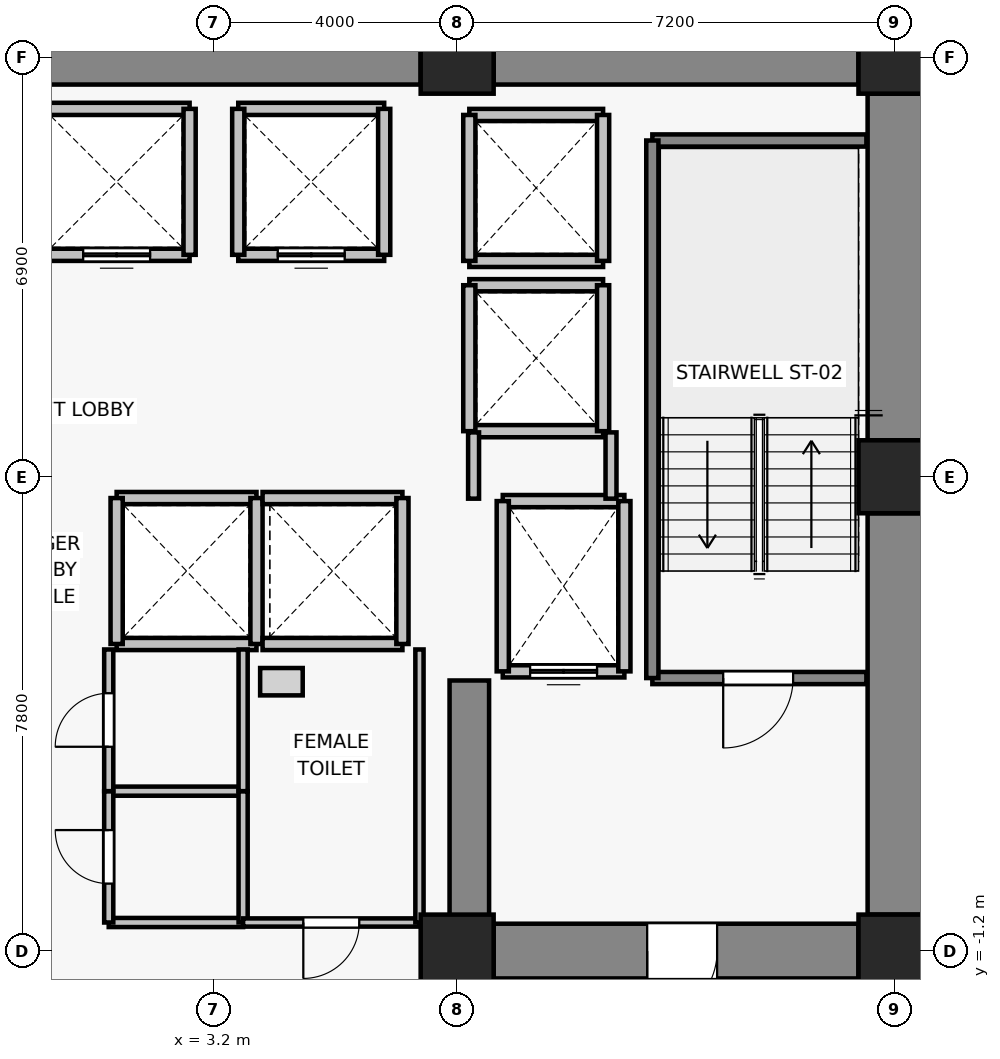
"""IFC4 building model, lengths in metres.
Left out: names, types, materials, properties, quantities, classifications, styles, units other than length and angle.
Written with IfcOpenShell. Run it as: python <this file> out.ifc"""

import sys

from ifc_helpers import new_model, si_unit, direction, frame, frame_2d, origin, origin_2d, place, context, subcontext, project, spatial, rectangle, extrude, source, transform, mapped, element, fill, save


model = new_model("IFC4")
c1 = context("Model", 3, precision=1e-05, world=origin(), true_north=direction((0.0, 1.0)))
c2 = subcontext(c1, "Body", "Model", "MODEL_VIEW")
j1 = project(units=[si_unit("LENGTHUNIT", "METRE"), si_unit("PLANEANGLEUNIT", "RADIAN")], contexts=[c1])
p1 = place(None, origin())
s1 = spatial("IfcSite", under=j1, at=p1, CompositionType="ELEMENT")
p2 = place(p1, origin())
s2 = spatial("IfcBuilding", under=s1, at=p2, CompositionType="ELEMENT")
p3 = place(p2, frame((0.0, 0.0, 67.0)))
s3 = spatial("IfcBuildingStorey", under=s2, at=p3, CompositionType="ELEMENT", Elevation=67.0)
for number, where, z_axis, x_axis in (
    (1, (7.2, -1.2, 0.0), (0.0, 0.0, 1.0), (1.0, 0.0, 0.0)),
    (2, (14.4, -1.2, 0.0), (0.0, 0.0, 1.0), (1.0, 0.0, 0.0)),
    (3, (14.4, 6.6, 0.0), (0.0, 0.0, 1.0), (1.0, 0.0, 0.0)),
    (4, (7.2, 13.5, 0.0), (0.0, 0.0, 1.0), (1.0, 0.0, 0.0)),
    (5, (14.4, 13.5, 0.0), (0.0, 0.0, 1.0), (1.0, 0.0, 0.0)),
):
    element("IfcColumn", number, at=place(p3, frame(where, z_axis=z_axis, x_axis=x_axis)), inside=s3, PredefinedType="COLUMN", context=c2, shape_type="SweptSolid", body=[
        extrude(rectangle(XDim=1.2, YDim=1.2, at=origin_2d()), origin(), (0.0, 0.0, 1.0), 3.3),
    ])
p4 = place(p3, frame((-6.6, 13.5, 0.0), z_axis=(0.0, 0.0, 1.0), x_axis=(1.0, 0.0, 0.0)))
e6 = element("IfcWall", 6, at=p4, inside=s3, PredefinedType="SHEAR", context=c2, shape_type="SweptSolid", body=[
    extrude(rectangle(XDim=13.2, YDim=0.9, at=frame_2d((6.6, 0.0))), origin(), (0.0, 0.0, 1.0), 3.075),
])
p5 = place(p3, frame((7.8, 13.5, 0.0), z_axis=(0.0, 0.0, 1.0), x_axis=(1.0, 0.0, 0.0)))
e7 = element("IfcWall", 7, at=p5, inside=s3, PredefinedType="SHEAR", context=c2, shape_type="SweptSolid", body=[
    extrude(rectangle(XDim=6.0, YDim=0.9, at=frame_2d((3.0, 0.0))), origin(), (0.0, 0.0, 1.0), 3.075),
])
p6 = place(p3, frame((14.4, -0.6, 0.0), z_axis=(0.0, 0.0, 1.0), x_axis=(0.0, 1.0, 0.0)))
e8 = element("IfcWall", 8, at=p6, inside=s3, PredefinedType="SHEAR", context=c2, shape_type="SweptSolid", body=[
    extrude(rectangle(XDim=6.6, YDim=0.9, at=frame_2d((3.3, 0.0))), origin(), (0.0, 0.0, 1.0), 3.075),
])
p7 = place(p3, frame((14.4, 7.2, 0.0), z_axis=(0.0, 0.0, 1.0), x_axis=(0.0, 1.0, 0.0)))
e9 = element("IfcWall", 9, at=p7, inside=s3, PredefinedType="SHEAR", context=c2, shape_type="SweptSolid", body=[
    extrude(rectangle(XDim=5.7, YDim=0.9, at=frame_2d((2.85, 0.0))), origin(), (0.0, 0.0, 1.0), 3.075),
])
p8 = place(p3, frame((13.8, -1.2, 0.0), z_axis=(0.0, 0.0, 1.0), x_axis=(-1.0, 0.0, 0.0)))
e10 = element("IfcWall", 10, at=p8, inside=s3, PredefinedType="SHEAR", context=c2, shape_type="SweptSolid", body=[
    extrude(rectangle(XDim=6.0, YDim=0.9, at=frame_2d((3.0, 0.0))), origin(), (0.0, 0.0, 1.0), 3.075),
])
p9 = place(p8, frame((2.325, 0.0, 0.0)))
e11 = element("IfcOpeningElement", 11, at=p9, cuts=e10, PredefinedType="OPENING", context=c2, shape_type="SweptSolid", body=[
    extrude(rectangle(XDim=1.15, YDim=2.15, at=frame_2d((0.575, 1.075))), frame((0.0, 0.46, 0.0), z_axis=(0.0, -1.0, 0.0), x_axis=(1.0, 0.0, 0.0)), (0.0, 0.0, 1.0), 0.92),
])
p10 = place(p3, frame((7.4, -0.75, 0.0), z_axis=(0.0, 0.0, 1.0), x_axis=(0.0, 1.0, 0.0)))
e12 = element("IfcWall", 12, at=p10, inside=s3, PredefinedType="SHEAR", context=c2, shape_type="SweptSolid", body=[
    extrude(rectangle(XDim=4.0, YDim=0.65, at=frame_2d((2.0, 0.0))), origin(), (0.0, 0.0, 1.0), 3.075),
])
p11 = place(p3, frame((9.95, 3.4, 0.0), z_axis=(0.0, 0.0, 1.0), x_axis=(-1.0, 0.0, 0.0)))
e13 = element("IfcWall", 13, at=p11, inside=s3, PredefinedType="SOLIDWALL", context=c2, shape_type="SweptSolid", body=[
    extrude(rectangle(XDim=2.0, YDim=0.2, at=frame_2d((1.0, 0.0))), origin(), (0.0, 0.0, 1.0), 3.075),
])
p12 = place(p11, frame((0.45, 0.0, 0.0)))
e14 = element("IfcOpeningElement", 14, at=p12, cuts=e13, PredefinedType="OPENING", context=c2, shape_type="SweptSolid", body=[
    extrude(rectangle(XDim=1.1, YDim=2.2, at=frame_2d((0.55, 1.1))), frame((0.0, 0.11, 0.0), z_axis=(0.0, -1.0, 0.0), x_axis=(1.0, 0.0, 0.0)), (0.0, 0.0, 1.0), 0.22),
])
p13 = place(p3, frame((7.95, 6.2, 0.0), z_axis=(0.0, 0.0, 1.0), x_axis=(1.0, 0.0, 0.0)))
e15 = element("IfcWall", 15, at=p13, inside=s3, PredefinedType="SOLIDWALL", context=c2, shape_type="SweptSolid", body=[
    extrude(rectangle(XDim=2.0, YDim=0.2, at=frame_2d((1.0, 0.0))), origin(), (0.0, 0.0, 1.0), 3.075),
])
for number, where, z_axis, x_axis in (
    (16, (7.95, 3.4, 0.0), (0.0, 0.0, 1.0), (0.0, 1.0, 0.0)),
    (17, (9.95, 6.2, 0.0), (0.0, 0.0, 1.0), (0.0, -1.0, 0.0)),
):
    element("IfcWall", number, at=place(p3, frame(where, z_axis=z_axis, x_axis=x_axis)), inside=s3, PredefinedType="SOLIDWALL", context=c2, shape_type="SweptSolid", body=[
        extrude(rectangle(XDim=2.8, YDim=0.2, at=frame_2d((1.4, 0.0))), origin(), (0.0, 0.0, 1.0), 3.075),
    ])
p14 = place(p3, frame((2.8, 10.25, 0.0), z_axis=(0.0, 0.0, 1.0), x_axis=(-1.0, 0.0, 0.0)))
e18 = element("IfcWall", 18, at=p14, inside=s3, PredefinedType="SOLIDWALL", context=c2, shape_type="SweptSolid", body=[
    extrude(rectangle(XDim=2.4, YDim=0.2, at=frame_2d((1.2, 0.0))), origin(), (0.0, 0.0, 1.0), 3.075),
])
p15 = place(p14, frame((0.65, 0.0, 0.0)))
e19 = element("IfcOpeningElement", 19, at=p15, cuts=e18, PredefinedType="OPENING", context=c2, shape_type="SweptSolid", body=[
    extrude(rectangle(XDim=1.1, YDim=2.2, at=frame_2d((0.55, 1.1))), frame((0.0, 0.11, 0.0), z_axis=(0.0, -1.0, 0.0), x_axis=(1.0, 0.0, 0.0)), (0.0, 0.0, 1.0), 0.22),
])
p16 = place(p3, frame((0.4, 12.65, 0.0), z_axis=(0.0, 0.0, 1.0), x_axis=(1.0, 0.0, 0.0)))
e20 = element("IfcWall", 20, at=p16, inside=s3, PredefinedType="SOLIDWALL", context=c2, shape_type="SweptSolid", body=[
    extrude(rectangle(XDim=2.4, YDim=0.2, at=frame_2d((1.2, 0.0))), origin(), (0.0, 0.0, 1.0), 3.075),
])
p17 = place(p3, frame((2.8, 12.65, 0.0), z_axis=(0.0, 0.0, 1.0), x_axis=(0.0, -1.0, 0.0)))
e21 = element("IfcWall", 21, at=p17, inside=s3, PredefinedType="SOLIDWALL", context=c2, shape_type="SweptSolid", body=[
    extrude(rectangle(XDim=2.4, YDim=0.2, at=frame_2d((1.2, 0.0))), origin(), (0.0, 0.0, 1.0), 3.075),
])
p18 = place(p3, frame((6.0, 10.25, 0.0), z_axis=(0.0, 0.0, 1.0), x_axis=(-1.0, 0.0, 0.0)))
e22 = element("IfcWall", 22, at=p18, inside=s3, PredefinedType="SOLIDWALL", context=c2, shape_type="SweptSolid", body=[
    extrude(rectangle(XDim=2.4, YDim=0.2, at=frame_2d((1.2, 0.0))), origin(), (0.0, 0.0, 1.0), 3.075),
])
p19 = place(p18, frame((0.65, 0.0, 0.0)))
e23 = element("IfcOpeningElement", 23, at=p19, cuts=e22, PredefinedType="OPENING", context=c2, shape_type="SweptSolid", body=[
    extrude(rectangle(XDim=1.1, YDim=2.2, at=frame_2d((0.55, 1.1))), frame((0.0, 0.11, 0.0), z_axis=(0.0, -1.0, 0.0), x_axis=(1.0, 0.0, 0.0)), (0.0, 0.0, 1.0), 0.22),
])
for number, where, z_axis, x_axis in (
    (24, (3.6, 12.65, 0.0), (0.0, 0.0, 1.0), (1.0, 0.0, 0.0)),
    (25, (3.6, 10.25, 0.0), (0.0, 0.0, 1.0), (0.0, 1.0, 0.0)),
    (26, (6.0, 12.65, 0.0), (0.0, 0.0, 1.0), (0.0, -1.0, 0.0)),
):
    element("IfcWall", number, at=place(p3, frame(where, z_axis=z_axis, x_axis=x_axis)), inside=s3, PredefinedType="SOLIDWALL", context=c2, shape_type="SweptSolid", body=[
        extrude(rectangle(XDim=2.4, YDim=0.2, at=frame_2d((1.2, 0.0))), origin(), (0.0, 0.0, 1.0), 3.075),
    ])
for number, where, z_axis, x_axis in (
    (27, (3.9, 3.85, 0.0), (0.0, 0.0, 1.0), (-1.0, 0.0, 0.0)),
    (28, (1.6, 6.25, 0.0), (0.0, 0.0, 1.0), (1.0, 0.0, 0.0)),
):
    element("IfcWall", number, at=place(p3, frame(where, z_axis=z_axis, x_axis=x_axis)), inside=s3, PredefinedType="SOLIDWALL", context=c2, shape_type="SweptSolid", body=[
        extrude(rectangle(XDim=2.3, YDim=0.2, at=frame_2d((1.15, 0.0))), origin(), (0.0, 0.0, 1.0), 3.075),
    ])
for number, where, z_axis, x_axis in (
    (29, (1.6, 3.85, 0.0), (0.0, 0.0, 1.0), (0.0, 1.0, 0.0)),
    (30, (3.9, 6.25, 0.0), (0.0, 0.0, 1.0), (0.0, -1.0, 0.0)),
):
    element("IfcWall", number, at=place(p3, frame(where, z_axis=z_axis, x_axis=x_axis)), inside=s3, PredefinedType="SOLIDWALL", context=c2, shape_type="SweptSolid", body=[
        extrude(rectangle(XDim=2.4, YDim=0.2, at=frame_2d((1.2, 0.0))), origin(), (0.0, 0.0, 1.0), 3.075),
    ])
for number, where, z_axis, x_axis in (
    (31, (6.3, 3.85, 0.0), (0.0, 0.0, 1.0), (-1.0, 0.0, 0.0)),
    (32, (4.0, 6.25, 0.0), (0.0, 0.0, 1.0), (1.0, 0.0, 0.0)),
):
    element("IfcWall", number, at=place(p3, frame(where, z_axis=z_axis, x_axis=x_axis)), inside=s3, PredefinedType="SOLIDWALL", context=c2, shape_type="SweptSolid", body=[
        extrude(rectangle(XDim=2.3, YDim=0.2, at=frame_2d((1.15, 0.0))), origin(), (0.0, 0.0, 1.0), 3.075),
    ])
p20 = place(p3, frame((6.3, 6.25, 0.0), z_axis=(0.0, 0.0, 1.0), x_axis=(0.0, -1.0, 0.0)))
e33 = element("IfcWall", 33, at=p20, inside=s3, PredefinedType="SOLIDWALL", context=c2, shape_type="SweptSolid", body=[
    extrude(rectangle(XDim=2.4, YDim=0.2, at=frame_2d((1.2, 0.0))), origin(), (0.0, 0.0, 1.0), 3.075),
])
for number, where, z_axis, x_axis in (
    (34, (9.6, 7.35, 0.0), (0.0, 0.0, 1.0), (-1.0, 0.0, 0.0)),
    (35, (7.4, 9.75, 0.0), (0.0, 0.0, 1.0), (1.0, 0.0, 0.0)),
):
    element("IfcWall", number, at=place(p3, frame(where, z_axis=z_axis, x_axis=x_axis)), inside=s3, PredefinedType="SOLIDWALL", context=c2, shape_type="SweptSolid", body=[
        extrude(rectangle(XDim=2.2, YDim=0.2, at=frame_2d((1.1, 0.0))), origin(), (0.0, 0.0, 1.0), 2.465),
    ])
p21 = place(p3, frame((7.4, 7.35, 0.0), z_axis=(0.0, 0.0, 1.0), x_axis=(0.0, 1.0, 0.0)))
e36 = element("IfcWall", 36, at=p21, inside=s3, PredefinedType="SOLIDWALL", context=c2, shape_type="SweptSolid", body=[
    extrude(rectangle(XDim=2.4, YDim=0.2, at=frame_2d((1.2, 0.0))), origin(), (0.0, 0.0, 1.0), 2.465),
])
p22 = place(p3, frame((9.6, 9.75, 0.0), z_axis=(0.0, 0.0, 1.0), x_axis=(0.0, -1.0, 0.0)))
e37 = element("IfcWall", 37, at=p22, inside=s3, PredefinedType="SOLIDWALL", context=c2, shape_type="SweptSolid", body=[
    extrude(rectangle(XDim=2.4, YDim=0.2, at=frame_2d((1.2, 0.0))), origin(), (0.0, 0.0, 1.0), 3.075),
])
for number, where, z_axis, x_axis in (
    (38, (9.6, 10.15, 0.0), (0.0, 0.0, 1.0), (-1.0, 0.0, 0.0)),
    (39, (7.4, 12.55, 0.0), (0.0, 0.0, 1.0), (1.0, 0.0, 0.0)),
):
    element("IfcWall", number, at=place(p3, frame(where, z_axis=z_axis, x_axis=x_axis)), inside=s3, PredefinedType="SOLIDWALL", context=c2, shape_type="SweptSolid", body=[
        extrude(rectangle(XDim=2.2, YDim=0.2, at=frame_2d((1.1, 0.0))), origin(), (0.0, 0.0, 1.0), 2.465),
    ])
p23 = place(p3, frame((7.4, 10.15, 0.0), z_axis=(0.0, 0.0, 1.0), x_axis=(0.0, 1.0, 0.0)))
e40 = element("IfcWall", 40, at=p23, inside=s3, PredefinedType="SOLIDWALL", context=c2, shape_type="SweptSolid", body=[
    extrude(rectangle(XDim=2.4, YDim=0.2, at=frame_2d((1.2, 0.0))), origin(), (0.0, 0.0, 1.0), 2.465),
])
p24 = place(p3, frame((9.6, 12.55, 0.0), z_axis=(0.0, 0.0, 1.0), x_axis=(0.0, -1.0, 0.0)))
e41 = element("IfcWall", 41, at=p24, inside=s3, PredefinedType="SOLIDWALL", context=c2, shape_type="SweptSolid", body=[
    extrude(rectangle(XDim=2.4, YDim=0.2, at=frame_2d((1.2, 0.0))), origin(), (0.0, 0.0, 1.0), 3.075),
])
p25 = place(p3, frame((13.93, 3.29, 0.0), z_axis=(0.0, 0.0, 1.0), x_axis=(-1.0, 0.0, 0.0)))
e42 = element("IfcWall", 42, at=p25, inside=s3, PredefinedType="SOLIDWALL", context=c2, shape_type="SweptSolid", body=[
    extrude(rectangle(XDim=3.52, YDim=0.2, at=frame_2d((1.76, 0.0))), origin(), (0.0, 0.0, 1.0), 3.075),
])
p26 = place(p25, frame((1.205, 0.0, 0.0)))
e43 = element("IfcOpeningElement", 43, at=p26, cuts=e42, PredefinedType="OPENING", context=c2, shape_type="SweptSolid", body=[
    extrude(rectangle(XDim=1.15, YDim=2.15, at=frame_2d((0.575, 1.075))), frame((0.0, 0.11, 0.0), z_axis=(0.0, -1.0, 0.0), x_axis=(1.0, 0.0, 0.0)), (0.0, 0.0, 1.0), 0.22),
])
p27 = place(p3, frame((10.41, 12.13, 0.0), z_axis=(0.0, 0.0, 1.0), x_axis=(1.0, 0.0, 0.0)))
e44 = element("IfcWall", 44, at=p27, inside=s3, PredefinedType="SOLIDWALL", context=c2, shape_type="SweptSolid", body=[
    extrude(rectangle(XDim=3.52, YDim=0.2, at=frame_2d((1.76, 0.0))), origin(), (0.0, 0.0, 1.0), 3.075),
])
p28 = place(p3, frame((10.41, 3.29, 0.0), z_axis=(0.0, 0.0, 1.0), x_axis=(0.0, 1.0, 0.0)))
e45 = element("IfcWall", 45, at=p28, inside=s3, PredefinedType="SOLIDWALL", context=c2, shape_type="SweptSolid", body=[
    extrude(rectangle(XDim=8.84, YDim=0.2, at=frame_2d((4.42, 0.0))), origin(), (0.0, 0.0, 1.0), 3.075),
])
p29 = place(p3, frame((7.47, 6.24, 0.0), z_axis=(0.0, 0.0, 1.0), x_axis=(0.0, 1.0, 0.0)))
e46 = element("IfcWall", 46, at=p29, inside=s3, PredefinedType="PARTITIONING", context=c2, shape_type="SweptSolid", body=[
    extrude(rectangle(XDim=1.09, YDim=0.18, at=frame_2d((0.545, 0.0))), origin(), (0.0, 0.0, 1.0), 2.465),
])
p30 = place(p3, frame((9.73, 7.33, 0.0), z_axis=(0.0, 0.0, 1.0), x_axis=(0.0, -1.0, 0.0)))
e47 = element("IfcWall", 47, at=p30, inside=s3, PredefinedType="PARTITIONING", context=c2, shape_type="SweptSolid", body=[
    extrude(rectangle(XDim=1.09, YDim=0.18, at=frame_2d((0.545, 0.0))), origin(), (0.0, 0.0, 1.0), 3.075),
])
for number, where, z_axis, x_axis in (
    (48, (3.68, -0.73, 0.0), (0.0, 0.0, 1.0), (-1.0, 0.0, 0.0)),
    (49, (1.47, 1.43, 0.0), (0.0, 0.0, 1.0), (1.0, 0.0, 0.0)),
):
    element("IfcWall", number, at=place(p3, frame(where, z_axis=z_axis, x_axis=x_axis)), inside=s3, PredefinedType="PARTITIONING", context=c2, shape_type="SweptSolid", body=[
        extrude(rectangle(XDim=2.21, YDim=0.15, at=frame_2d((1.105, 0.0))), origin(), (0.0, 0.0, 1.0), 3.075),
    ])
p31 = place(p3, frame((1.47, -0.73, 0.0), z_axis=(0.0, 0.0, 1.0), x_axis=(0.0, 1.0, 0.0)))
e50 = element("IfcWall", 50, at=p31, inside=s3, PredefinedType="PARTITIONING", context=c2, shape_type="SweptSolid", body=[
    extrude(rectangle(XDim=2.16, YDim=0.15, at=frame_2d((1.08, 0.0))), origin(), (0.0, 0.0, 1.0), 3.075),
])
p32 = place(p31, frame((0.64, 0.0, 0.0)))
e51 = element("IfcOpeningElement", 51, at=p32, cuts=e50, PredefinedType="OPENING", context=c2, shape_type="SweptSolid", body=[
    extrude(rectangle(XDim=0.88, YDim=2.1, at=frame_2d((0.44, 1.05))), frame((0.0, 0.085, 0.0), z_axis=(0.0, -1.0, 0.0), x_axis=(1.0, 0.0, 0.0)), (0.0, 0.0, 1.0), 0.17),
])
p33 = place(p3, frame((3.68, 1.43, 0.0), z_axis=(0.0, 0.0, 1.0), x_axis=(0.0, -1.0, 0.0)))
e52 = element("IfcWall", 52, at=p33, inside=s3, PredefinedType="PARTITIONING", context=c2, shape_type="SweptSolid", body=[
    extrude(rectangle(XDim=2.16, YDim=0.15, at=frame_2d((1.08, 0.0))), origin(), (0.0, 0.0, 1.0), 3.075),
])
p34 = place(p3, frame((1.47, 1.43, 0.0), z_axis=(0.0, 0.0, 1.0), x_axis=(0.0, 1.0, 0.0)))
e53 = element("IfcWall", 53, at=p34, inside=s3, PredefinedType="PARTITIONING", context=c2, shape_type="SweptSolid", body=[
    extrude(rectangle(XDim=2.33, YDim=0.15, at=frame_2d((1.165, 0.0))), origin(), (0.0, 0.0, 1.0), 3.075),
])
p35 = place(p34, frame((0.73, 0.0, 0.0)))
e54 = element("IfcOpeningElement", 54, at=p35, cuts=e53, PredefinedType="OPENING", context=c2, shape_type="SweptSolid", body=[
    extrude(rectangle(XDim=0.88, YDim=2.15, at=frame_2d((0.44, 1.075))), frame((0.0, 0.085, 0.0), z_axis=(0.0, -1.0, 0.0), x_axis=(1.0, 0.0, 0.0)), (0.0, 0.0, 1.0), 0.17),
])
p36 = place(p3, frame((3.68, 3.76, 0.0), z_axis=(0.0, 0.0, 1.0), x_axis=(0.0, -1.0, 0.0)))
e55 = element("IfcWall", 55, at=p36, inside=s3, PredefinedType="PARTITIONING", context=c2, shape_type="SweptSolid", body=[
    extrude(rectangle(XDim=2.33, YDim=0.15, at=frame_2d((1.165, 0.0))), origin(), (0.0, 0.0, 1.0), 3.075),
])
p37 = place(p3, frame((6.58, -0.73, 0.0), z_axis=(0.0, 0.0, 1.0), x_axis=(-1.0, 0.0, 0.0)))
e56 = element("IfcWall", 56, at=p37, inside=s3, PredefinedType="PARTITIONING", context=c2, shape_type="SweptSolid", body=[
    extrude(rectangle(XDim=2.9, YDim=0.135, at=frame_2d((1.45, 0.0))), origin(), (0.0, 0.0, 1.0), 3.075),
])
p38 = place(p37, frame((0.99, 0.0, 0.0)))
e57 = element("IfcOpeningElement", 57, at=p38, cuts=e56, PredefinedType="OPENING", context=c2, shape_type="SweptSolid", body=[
    extrude(rectangle(XDim=0.92, YDim=2.1, at=frame_2d((0.46, 1.05))), frame((0.0, 0.077, 0.0), z_axis=(0.0, -1.0, 0.0), x_axis=(1.0, 0.0, 0.0)), (0.0, 0.0, 1.0), 0.155),
])
p39 = place(p3, frame((6.58, 3.76, 0.0), z_axis=(0.0, 0.0, 1.0), x_axis=(0.0, -1.0, 0.0)))
e58 = element("IfcWall", 58, at=p39, inside=s3, PredefinedType="PARTITIONING", context=c2, shape_type="SweptSolid", body=[
    extrude(rectangle(XDim=4.49, YDim=0.135, at=frame_2d((2.245, 0.0))), origin(), (0.0, 0.0, 1.0), 3.075),
])
m1 = source(origin(), c2, "Body", "SweptSolid", [
    extrude(rectangle(XDim=1.1, YDim=2.2, at=frame_2d((0.55, 1.1))), frame((0.0, 0.025, 0.0), z_axis=(0.0, -1.0, 0.0), x_axis=(1.0, 0.0, 0.0)), (0.0, 0.0, 1.0), 0.05),
])
p40 = place(p12, origin())
e59 = element("IfcDoor", 59, at=p40, inside=s3, OperationType="DOUBLE_DOOR_SLIDING", PredefinedType="DOOR", context=c2, shape_type="MappedRepresentation", body=[
    mapped(m1, transform((0.0, 0.0, 0.0), x_axis=(1.0, 0.0, 0.0), y_axis=(0.0, 1.0, 0.0), z_axis=(0.0, 0.0, 1.0), scale=1.0)),
])
fill(e14, e59)
p41 = place(p15, origin())
e60 = element("IfcDoor", 60, at=p41, inside=s3, OperationType="DOUBLE_DOOR_SLIDING", PredefinedType="DOOR", context=c2, shape_type="MappedRepresentation", body=[
    mapped(m1, transform((0.0, 0.0, 0.0), x_axis=(1.0, 0.0, 0.0), y_axis=(0.0, 1.0, 0.0), z_axis=(0.0, 0.0, 1.0), scale=1.0)),
])
fill(e19, e60)
p42 = place(p19, origin())
e61 = element("IfcDoor", 61, at=p42, inside=s3, OperationType="DOUBLE_DOOR_SLIDING", PredefinedType="DOOR", context=c2, shape_type="MappedRepresentation", body=[
    mapped(m1, transform((0.0, 0.0, 0.0), x_axis=(1.0, 0.0, 0.0), y_axis=(0.0, 1.0, 0.0), z_axis=(0.0, 0.0, 1.0), scale=1.0)),
])
fill(e23, e61)
m2 = source(origin(), c2, "Body", "SweptSolid", [
    extrude(rectangle(XDim=1.15, YDim=2.15, at=frame_2d((0.575, 1.075))), frame((0.0, 0.025, 0.0), z_axis=(0.0, -1.0, 0.0), x_axis=(1.0, 0.0, 0.0)), (0.0, 0.0, 1.0), 0.05),
])
p43 = place(p26, origin())
e62 = element("IfcDoor", 62, at=p43, inside=s3, OperationType="SINGLE_SWING_RIGHT", PredefinedType="DOOR", context=c2, shape_type="MappedRepresentation", body=[
    mapped(m2, transform((0.0, 0.0, 0.0), x_axis=(1.0, 0.0, 0.0), y_axis=(0.0, 1.0, 0.0), z_axis=(0.0, 0.0, 1.0), scale=1.0)),
])
fill(e43, e62)
p44 = place(p9, origin())
e63 = element("IfcDoor", 63, at=p44, inside=s3, OperationType="SINGLE_SWING_RIGHT", PredefinedType="DOOR", context=c2, shape_type="MappedRepresentation", body=[
    mapped(m2, transform((0.0, 0.0, 0.0), x_axis=(1.0, 0.0, 0.0), y_axis=(0.0, 1.0, 0.0), z_axis=(0.0, 0.0, 1.0), scale=1.0)),
])
fill(e11, e63)
m3 = source(origin(), c2, "Body", "SweptSolid", [
    extrude(rectangle(XDim=0.88, YDim=2.1, at=frame_2d((0.44, 1.05))), frame((0.0, 0.025, 0.0), z_axis=(0.0, -1.0, 0.0), x_axis=(1.0, 0.0, 0.0)), (0.0, 0.0, 1.0), 0.05),
])
p45 = place(p32, origin())
e64 = element("IfcDoor", 64, at=p45, inside=s3, OperationType="SINGLE_SWING_RIGHT", PredefinedType="DOOR", context=c2, shape_type="MappedRepresentation", body=[
    mapped(m3, transform((0.0, 0.0, 0.0), x_axis=(1.0, 0.0, 0.0), y_axis=(0.0, 1.0, 0.0), z_axis=(0.0, 0.0, 1.0), scale=1.0)),
])
fill(e51, e64)
m4 = source(origin(), c2, "Body", "SweptSolid", [
    extrude(rectangle(XDim=0.88, YDim=2.15, at=frame_2d((0.44, 1.075))), frame((0.0, 0.025, 0.0), z_axis=(0.0, -1.0, 0.0), x_axis=(1.0, 0.0, 0.0)), (0.0, 0.0, 1.0), 0.05),
])
p46 = place(p35, origin())
e65 = element("IfcDoor", 65, at=p46, inside=s3, OperationType="SINGLE_SWING_LEFT", PredefinedType="DOOR", context=c2, shape_type="MappedRepresentation", body=[
    mapped(m4, transform((0.0, 0.0, 0.0), x_axis=(1.0, 0.0, 0.0), y_axis=(0.0, 1.0, 0.0), z_axis=(0.0, 0.0, 1.0), scale=1.0)),
])
fill(e54, e65)
m5 = source(origin(), c2, "Body", "SweptSolid", [
    extrude(rectangle(XDim=0.92, YDim=2.1, at=frame_2d((0.46, 1.05))), frame((0.0, 0.025, 0.0), z_axis=(0.0, -1.0, 0.0), x_axis=(1.0, 0.0, 0.0)), (0.0, 0.0, 1.0), 0.05),
])
p47 = place(p38, origin())
e66 = element("IfcDoor", 66, at=p47, inside=s3, OperationType="SINGLE_SWING_RIGHT", PredefinedType="DOOR", context=c2, shape_type="MappedRepresentation", body=[
    mapped(m5, transform((0.0, 0.0, 0.0), x_axis=(1.0, 0.0, 0.0), y_axis=(0.0, 1.0, 0.0), z_axis=(0.0, 0.0, 1.0), scale=1.0)),
])
fill(e57, e66)
save(model, sys.argv[1])
